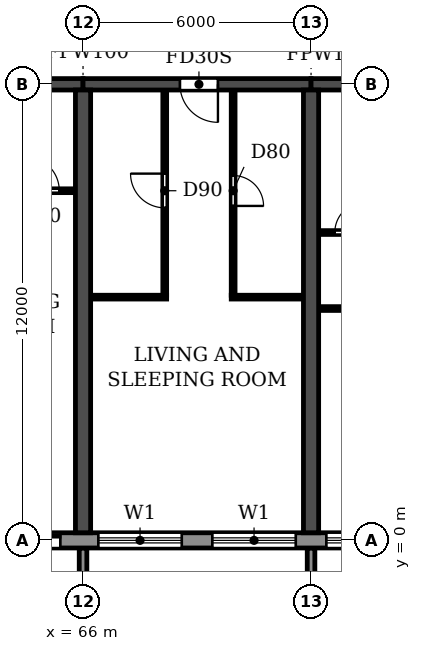
"""IFC4 building model, lengths in metres.
Left out: names, types, materials, properties, quantities, classifications, styles, units other than length and angle.
Written with IfcOpenShell. Run it as: python <this file> out.ifc"""

import sys

from ifc_helpers import new_model, si_unit, direction, frame, frame_2d, origin, place, context, subcontext, project, spatial, polyline, rectangle, outline, extrude, source, transform, mapped, element, fill, save


model = new_model("IFC4")
c1 = context("Model", 3, precision=1e-05, world=origin(), true_north=direction((0.0, 1.0)))
c2 = subcontext(c1, "Body", "Model", "MODEL_VIEW")
j1 = project(units=[si_unit("LENGTHUNIT", "METRE"), si_unit("PLANEANGLEUNIT", "RADIAN")], contexts=[c1])
p1 = place(None, origin())
s1 = spatial("IfcSite", under=j1, at=p1, CompositionType="ELEMENT")
p2 = place(p1, origin())
s2 = spatial("IfcBuilding", under=s1, at=p2, CompositionType="ELEMENT")
p3 = place(p2, frame((0.0, 0.0, 43.2)))
s3 = spatial("IfcBuildingStorey", under=s2, at=p3, CompositionType="ELEMENT", Elevation=43.2)
for number, where, z_axis, x_axis in (
    (1, (66.0, 0.2, 0.0), (0.0, 0.0, 1.0), (0.0, 1.0, 0.0)),
    (2, (72.0, 0.2, 0.0), (0.0, 0.0, 1.0), (0.0, 1.0, 0.0)),
):
    element("IfcWall", number, at=place(p3, frame(where, z_axis=z_axis, x_axis=x_axis)), inside=s3, PredefinedType="SHEAR", context=c2, shape_type="SweptSolid", body=[
        extrude(rectangle(XDim=11.65, YDim=0.4, at=frame_2d((5.825, 0.0))), origin(), (0.0, 0.0, 1.0), 3.05),
    ])
p4 = place(p3, frame((60.0, 12.0, 0.0), z_axis=(0.0, 0.0, 1.0), x_axis=(1.0, 0.0, 0.0)))
e3 = element("IfcWall", 3, at=p4, inside=s3, PredefinedType="SHEAR", context=c2, shape_type="SweptSolid", body=[
    extrude(rectangle(XDim=6.0, YDim=0.3, at=frame_2d((3.0, 0.0))), origin(), (0.0, 0.0, 1.0), 2.45),
])
p5 = place(p4, frame((2.45, 0.0, 0.0)))
e4 = element("IfcOpeningElement", 4, at=p5, cuts=e3, PredefinedType="OPENING", context=c2, shape_type="SweptSolid", body=[
    extrude(rectangle(XDim=1.0, YDim=2.1, at=frame_2d((0.5, 1.05))), frame((0.0, 0.16, 0.0), z_axis=(0.0, -1.0, 0.0), x_axis=(1.0, 0.0, 0.0)), (0.0, 0.0, 1.0), 0.32),
])
p6 = place(p3, frame((66.0, 12.0, 0.0), z_axis=(0.0, 0.0, 1.0), x_axis=(1.0, 0.0, 0.0)))
e5 = element("IfcWall", 5, at=p6, inside=s3, PredefinedType="SHEAR", context=c2, shape_type="SweptSolid", body=[
    extrude(rectangle(XDim=6.0, YDim=0.3, at=frame_2d((3.0, 0.0))), origin(), (0.0, 0.0, 1.0), 2.45),
])
p7 = place(p6, frame((2.55, 0.0, 0.0)))
e6 = element("IfcOpeningElement", 6, at=p7, cuts=e5, PredefinedType="OPENING", context=c2, shape_type="SweptSolid", body=[
    extrude(rectangle(XDim=1.0, YDim=2.1, at=frame_2d((0.5, 1.05))), frame((0.0, 0.16, 0.0), z_axis=(0.0, -1.0, 0.0), x_axis=(1.0, 0.0, 0.0)), (0.0, 0.0, 1.0), 0.32),
])
p8 = place(p3, frame((72.0, 12.0, 0.0), z_axis=(0.0, 0.0, 1.0), x_axis=(1.0, 0.0, 0.0)))
e7 = element("IfcWall", 7, at=p8, inside=s3, PredefinedType="SHEAR", context=c2, shape_type="SweptSolid", body=[
    extrude(rectangle(XDim=6.0, YDim=0.3, at=frame_2d((3.0, 0.0))), origin(), (0.0, 0.0, 1.0), 2.45),
])
p9 = place(p8, frame((2.45, 0.0, 0.0)))
e8 = element("IfcOpeningElement", 8, at=p9, cuts=e7, PredefinedType="OPENING", context=c2, shape_type="SweptSolid", body=[
    extrude(rectangle(XDim=1.0, YDim=2.1, at=frame_2d((0.5, 1.05))), frame((0.0, 0.16, 0.0), z_axis=(0.0, -1.0, 0.0), x_axis=(1.0, 0.0, 0.0)), (0.0, 0.0, 1.0), 0.32),
])
p10 = place(p3, frame((4.683, 0.0, 0.0), z_axis=(0.0, 0.0, 1.0), x_axis=(1.0, 0.0, 0.0)))
e9 = element("IfcWall", 9, at=p10, inside=s3, PredefinedType="STANDARD", context=c2, shape_type="SweptSolid", body=[
    extrude(rectangle(XDim=92.634, YDim=0.4, at=frame_2d((46.317, 0.0))), origin(), (0.0, 0.0, 1.0), 3.05),
])
p11 = place(p10, frame((1.717, 0.0, 0.9)))
e10 = element("IfcOpeningElement", 10, at=p11, cuts=e9, PredefinedType="OPENING", context=c2, shape_type="SweptSolid", body=[
    extrude(rectangle(XDim=2.2, YDim=1.5, at=frame_2d((1.1, 0.75))), frame((0.0, 0.21, 0.0), z_axis=(0.0, -1.0, 0.0), x_axis=(1.0, 0.0, 0.0)), (0.0, 0.0, 1.0), 0.42),
])
p12 = place(p10, frame((4.717, 0.0, 0.9)))
e11 = element("IfcOpeningElement", 11, at=p12, cuts=e9, PredefinedType="OPENING", context=c2, shape_type="SweptSolid", body=[
    extrude(rectangle(XDim=2.2, YDim=1.5, at=frame_2d((1.1, 0.75))), frame((0.0, 0.21, 0.0), z_axis=(0.0, -1.0, 0.0), x_axis=(1.0, 0.0, 0.0)), (0.0, 0.0, 1.0), 0.42),
])
p13 = place(p10, frame((7.717, 0.0, 0.9)))
e12 = element("IfcOpeningElement", 12, at=p13, cuts=e9, PredefinedType="OPENING", context=c2, shape_type="SweptSolid", body=[
    extrude(rectangle(XDim=2.2, YDim=1.5, at=frame_2d((1.1, 0.75))), frame((0.0, 0.21, 0.0), z_axis=(0.0, -1.0, 0.0), x_axis=(1.0, 0.0, 0.0)), (0.0, 0.0, 1.0), 0.42),
])
p14 = place(p10, frame((10.917, 0.0, 0.0)))
e13 = element("IfcOpeningElement", 13, at=p14, cuts=e9, PredefinedType="OPENING", context=c2, shape_type="SweptSolid", body=[
    extrude(rectangle(XDim=1.8, YDim=2.4, at=frame_2d((0.9, 1.2))), frame((0.0, 0.21, 0.0), z_axis=(0.0, -1.0, 0.0), x_axis=(1.0, 0.0, 0.0)), (0.0, 0.0, 1.0), 0.42),
])
p15 = place(p10, frame((13.717, 0.0, 0.9)))
e14 = element("IfcOpeningElement", 14, at=p15, cuts=e9, PredefinedType="OPENING", context=c2, shape_type="SweptSolid", body=[
    extrude(rectangle(XDim=2.2, YDim=1.5, at=frame_2d((1.1, 0.75))), frame((0.0, 0.21, 0.0), z_axis=(0.0, -1.0, 0.0), x_axis=(1.0, 0.0, 0.0)), (0.0, 0.0, 1.0), 0.42),
])
p16 = place(p10, frame((16.717, 0.0, 0.9)))
e15 = element("IfcOpeningElement", 15, at=p16, cuts=e9, PredefinedType="OPENING", context=c2, shape_type="SweptSolid", body=[
    extrude(rectangle(XDim=2.2, YDim=1.5, at=frame_2d((1.1, 0.75))), frame((0.0, 0.21, 0.0), z_axis=(0.0, -1.0, 0.0), x_axis=(1.0, 0.0, 0.0)), (0.0, 0.0, 1.0), 0.42),
])
p17 = place(p10, frame((19.917, 0.0, 0.0)))
e16 = element("IfcOpeningElement", 16, at=p17, cuts=e9, PredefinedType="OPENING", context=c2, shape_type="SweptSolid", body=[
    extrude(rectangle(XDim=1.8, YDim=2.4, at=frame_2d((0.9, 1.2))), frame((0.0, 0.21, 0.0), z_axis=(0.0, -1.0, 0.0), x_axis=(1.0, 0.0, 0.0)), (0.0, 0.0, 1.0), 0.42),
])
p18 = place(p10, frame((22.717, 0.0, 0.9)))
e17 = element("IfcOpeningElement", 17, at=p18, cuts=e9, PredefinedType="OPENING", context=c2, shape_type="SweptSolid", body=[
    extrude(rectangle(XDim=2.2, YDim=1.5, at=frame_2d((1.1, 0.75))), frame((0.0, 0.21, 0.0), z_axis=(0.0, -1.0, 0.0), x_axis=(1.0, 0.0, 0.0)), (0.0, 0.0, 1.0), 0.42),
])
p19 = place(p10, frame((25.717, 0.0, 0.9)))
e18 = element("IfcOpeningElement", 18, at=p19, cuts=e9, PredefinedType="OPENING", context=c2, shape_type="SweptSolid", body=[
    extrude(rectangle(XDim=2.2, YDim=1.5, at=frame_2d((1.1, 0.75))), frame((0.0, 0.21, 0.0), z_axis=(0.0, -1.0, 0.0), x_axis=(1.0, 0.0, 0.0)), (0.0, 0.0, 1.0), 0.42),
])
p20 = place(p10, frame((28.717, 0.0, 0.9)))
e19 = element("IfcOpeningElement", 19, at=p20, cuts=e9, PredefinedType="OPENING", context=c2, shape_type="SweptSolid", body=[
    extrude(rectangle(XDim=2.2, YDim=1.5, at=frame_2d((1.1, 0.75))), frame((0.0, 0.21, 0.0), z_axis=(0.0, -1.0, 0.0), x_axis=(1.0, 0.0, 0.0)), (0.0, 0.0, 1.0), 0.42),
])
p21 = place(p10, frame((31.717, 0.0, 0.9)))
e20 = element("IfcOpeningElement", 20, at=p21, cuts=e9, PredefinedType="OPENING", context=c2, shape_type="SweptSolid", body=[
    extrude(rectangle(XDim=2.2, YDim=1.5, at=frame_2d((1.1, 0.75))), frame((0.0, 0.21, 0.0), z_axis=(0.0, -1.0, 0.0), x_axis=(1.0, 0.0, 0.0)), (0.0, 0.0, 1.0), 0.42),
])
p22 = place(p10, frame((34.917, 0.0, 0.0)))
e21 = element("IfcOpeningElement", 21, at=p22, cuts=e9, PredefinedType="OPENING", context=c2, shape_type="SweptSolid", body=[
    extrude(rectangle(XDim=1.8, YDim=2.4, at=frame_2d((0.9, 1.2))), frame((0.0, 0.21, 0.0), z_axis=(0.0, -1.0, 0.0), x_axis=(1.0, 0.0, 0.0)), (0.0, 0.0, 1.0), 0.42),
])
p23 = place(p10, frame((37.717, 0.0, 0.9)))
e22 = element("IfcOpeningElement", 22, at=p23, cuts=e9, PredefinedType="OPENING", context=c2, shape_type="SweptSolid", body=[
    extrude(rectangle(XDim=2.2, YDim=1.5, at=frame_2d((1.1, 0.75))), frame((0.0, 0.21, 0.0), z_axis=(0.0, -1.0, 0.0), x_axis=(1.0, 0.0, 0.0)), (0.0, 0.0, 1.0), 0.42),
])
p24 = place(p10, frame((40.717, 0.0, 0.9)))
e23 = element("IfcOpeningElement", 23, at=p24, cuts=e9, PredefinedType="OPENING", context=c2, shape_type="SweptSolid", body=[
    extrude(rectangle(XDim=2.2, YDim=1.5, at=frame_2d((1.1, 0.75))), frame((0.0, 0.21, 0.0), z_axis=(0.0, -1.0, 0.0), x_axis=(1.0, 0.0, 0.0)), (0.0, 0.0, 1.0), 0.42),
])
p25 = place(p10, frame((43.717, 0.0, 0.9)))
e24 = element("IfcOpeningElement", 24, at=p25, cuts=e9, PredefinedType="OPENING", context=c2, shape_type="SweptSolid", body=[
    extrude(rectangle(XDim=2.2, YDim=1.5, at=frame_2d((1.1, 0.75))), frame((0.0, 0.21, 0.0), z_axis=(0.0, -1.0, 0.0), x_axis=(1.0, 0.0, 0.0)), (0.0, 0.0, 1.0), 0.42),
])
p26 = place(p10, frame((46.917, 0.0, 0.0)))
e25 = element("IfcOpeningElement", 25, at=p26, cuts=e9, PredefinedType="OPENING", context=c2, shape_type="SweptSolid", body=[
    extrude(rectangle(XDim=1.8, YDim=2.4, at=frame_2d((0.9, 1.2))), frame((0.0, 0.21, 0.0), z_axis=(0.0, -1.0, 0.0), x_axis=(1.0, 0.0, 0.0)), (0.0, 0.0, 1.0), 0.42),
])
p27 = place(p10, frame((49.717, 0.0, 0.9)))
e26 = element("IfcOpeningElement", 26, at=p27, cuts=e9, PredefinedType="OPENING", context=c2, shape_type="SweptSolid", body=[
    extrude(rectangle(XDim=2.2, YDim=1.5, at=frame_2d((1.1, 0.75))), frame((0.0, 0.21, 0.0), z_axis=(0.0, -1.0, 0.0), x_axis=(1.0, 0.0, 0.0)), (0.0, 0.0, 1.0), 0.42),
])
p28 = place(p10, frame((52.717, 0.0, 0.9)))
e27 = element("IfcOpeningElement", 27, at=p28, cuts=e9, PredefinedType="OPENING", context=c2, shape_type="SweptSolid", body=[
    extrude(rectangle(XDim=2.2, YDim=1.5, at=frame_2d((1.1, 0.75))), frame((0.0, 0.21, 0.0), z_axis=(0.0, -1.0, 0.0), x_axis=(1.0, 0.0, 0.0)), (0.0, 0.0, 1.0), 0.42),
])
p29 = place(p10, frame((55.717, 0.0, 0.9)))
e28 = element("IfcOpeningElement", 28, at=p29, cuts=e9, PredefinedType="OPENING", context=c2, shape_type="SweptSolid", body=[
    extrude(rectangle(XDim=2.2, YDim=1.5, at=frame_2d((1.1, 0.75))), frame((0.0, 0.21, 0.0), z_axis=(0.0, -1.0, 0.0), x_axis=(1.0, 0.0, 0.0)), (0.0, 0.0, 1.0), 0.42),
])
p30 = place(p10, frame((58.917, 0.0, 0.0)))
e29 = element("IfcOpeningElement", 29, at=p30, cuts=e9, PredefinedType="OPENING", context=c2, shape_type="SweptSolid", body=[
    extrude(rectangle(XDim=1.8, YDim=2.4, at=frame_2d((0.9, 1.2))), frame((0.0, 0.21, 0.0), z_axis=(0.0, -1.0, 0.0), x_axis=(1.0, 0.0, 0.0)), (0.0, 0.0, 1.0), 0.42),
])
p31 = place(p10, frame((61.717, 0.0, 0.9)))
e30 = element("IfcOpeningElement", 30, at=p31, cuts=e9, PredefinedType="OPENING", context=c2, shape_type="SweptSolid", body=[
    extrude(rectangle(XDim=2.2, YDim=1.5, at=frame_2d((1.1, 0.75))), frame((0.0, 0.21, 0.0), z_axis=(0.0, -1.0, 0.0), x_axis=(1.0, 0.0, 0.0)), (0.0, 0.0, 1.0), 0.42),
])
p32 = place(p10, frame((64.717, 0.0, 0.9)))
e31 = element("IfcOpeningElement", 31, at=p32, cuts=e9, PredefinedType="OPENING", context=c2, shape_type="SweptSolid", body=[
    extrude(rectangle(XDim=2.2, YDim=1.5, at=frame_2d((1.1, 0.75))), frame((0.0, 0.21, 0.0), z_axis=(0.0, -1.0, 0.0), x_axis=(1.0, 0.0, 0.0)), (0.0, 0.0, 1.0), 0.42),
])
p33 = place(p10, frame((67.717, 0.0, 0.9)))
e32 = element("IfcOpeningElement", 32, at=p33, cuts=e9, PredefinedType="OPENING", context=c2, shape_type="SweptSolid", body=[
    extrude(rectangle(XDim=2.2, YDim=1.5, at=frame_2d((1.1, 0.75))), frame((0.0, 0.21, 0.0), z_axis=(0.0, -1.0, 0.0), x_axis=(1.0, 0.0, 0.0)), (0.0, 0.0, 1.0), 0.42),
])
p34 = place(p10, frame((70.917, 0.0, 0.0)))
e33 = element("IfcOpeningElement", 33, at=p34, cuts=e9, PredefinedType="OPENING", context=c2, shape_type="SweptSolid", body=[
    extrude(rectangle(XDim=1.8, YDim=2.4, at=frame_2d((0.9, 1.2))), frame((0.0, 0.21, 0.0), z_axis=(0.0, -1.0, 0.0), x_axis=(1.0, 0.0, 0.0)), (0.0, 0.0, 1.0), 0.42),
])
p35 = place(p10, frame((73.717, 0.0, 0.9)))
e34 = element("IfcOpeningElement", 34, at=p35, cuts=e9, PredefinedType="OPENING", context=c2, shape_type="SweptSolid", body=[
    extrude(rectangle(XDim=2.2, YDim=1.5, at=frame_2d((1.1, 0.75))), frame((0.0, 0.21, 0.0), z_axis=(0.0, -1.0, 0.0), x_axis=(1.0, 0.0, 0.0)), (0.0, 0.0, 1.0), 0.42),
])
p36 = place(p10, frame((76.717, 0.0, 0.9)))
e35 = element("IfcOpeningElement", 35, at=p36, cuts=e9, PredefinedType="OPENING", context=c2, shape_type="SweptSolid", body=[
    extrude(rectangle(XDim=2.2, YDim=1.5, at=frame_2d((1.1, 0.75))), frame((0.0, 0.21, 0.0), z_axis=(0.0, -1.0, 0.0), x_axis=(1.0, 0.0, 0.0)), (0.0, 0.0, 1.0), 0.42),
])
p37 = place(p10, frame((79.717, 0.0, 0.9)))
e36 = element("IfcOpeningElement", 36, at=p37, cuts=e9, PredefinedType="OPENING", context=c2, shape_type="SweptSolid", body=[
    extrude(rectangle(XDim=2.2, YDim=1.5, at=frame_2d((1.1, 0.75))), frame((0.0, 0.21, 0.0), z_axis=(0.0, -1.0, 0.0), x_axis=(1.0, 0.0, 0.0)), (0.0, 0.0, 1.0), 0.42),
])
p38 = place(p10, frame((82.917, 0.0, 0.0)))
e37 = element("IfcOpeningElement", 37, at=p38, cuts=e9, PredefinedType="OPENING", context=c2, shape_type="SweptSolid", body=[
    extrude(rectangle(XDim=1.8, YDim=2.4, at=frame_2d((0.9, 1.2))), frame((0.0, 0.21, 0.0), z_axis=(0.0, -1.0, 0.0), x_axis=(1.0, 0.0, 0.0)), (0.0, 0.0, 1.0), 0.42),
])
p39 = place(p10, frame((85.717, 0.0, 0.9)))
e38 = element("IfcOpeningElement", 38, at=p39, cuts=e9, PredefinedType="OPENING", context=c2, shape_type="SweptSolid", body=[
    extrude(rectangle(XDim=2.2, YDim=1.5, at=frame_2d((1.1, 0.75))), frame((0.0, 0.21, 0.0), z_axis=(0.0, -1.0, 0.0), x_axis=(1.0, 0.0, 0.0)), (0.0, 0.0, 1.0), 0.42),
])
p40 = place(p10, frame((88.717, 0.0, 0.9)))
e39 = element("IfcOpeningElement", 39, at=p40, cuts=e9, PredefinedType="OPENING", context=c2, shape_type="SweptSolid", body=[
    extrude(rectangle(XDim=2.2, YDim=1.5, at=frame_2d((1.1, 0.75))), frame((0.0, 0.21, 0.0), z_axis=(0.0, -1.0, 0.0), x_axis=(1.0, 0.0, 0.0)), (0.0, 0.0, 1.0), 0.42),
])
m1 = source(origin(), c2, "Body", "SweptSolid", [
    extrude(outline(polyline([(0.0, 0.0), (0.2, 0.0), (0.2, 1.65), (0.0, 1.65), (0.0, 0.0)])), origin(), (0.0, 0.0, 1.0), 3.1),
])
for number, where in (
    (40, (65.9, -1.85, 0.0)),
    (41, (71.9, -1.85, 0.0)),
):
    element("IfcWall", number, at=place(p3, frame(where)), inside=s3, PredefinedType="STANDARD", context=c2, shape_type="MappedRepresentation", body=[
        mapped(m1, transform((0.0, 0.0, 0.0))),
    ])
p41 = place(p3, frame((72.21, 6.1, 0.0), z_axis=(0.0, 0.0, 1.0), x_axis=(1.0, 0.0, 0.0)))
e42 = element("IfcWall", 42, at=p41, inside=s3, PredefinedType="PARTITIONING", context=c2, shape_type="SweptSolid", body=[
    extrude(rectangle(XDim=2.84, YDim=0.1, at=frame_2d((1.42, 0.0))), origin(), (0.0, 0.0, 1.0), 3.05),
])
p42 = place(p41, frame((1.39, 0.0, 0.0)))
e43 = element("IfcOpeningElement", 43, at=p42, cuts=e42, PredefinedType="OPENING", context=c2, shape_type="SweptSolid", body=[
    extrude(rectangle(XDim=0.9, YDim=2.1, at=frame_2d((0.45, 1.05))), frame((0.0, 0.06, 0.0), z_axis=(0.0, -1.0, 0.0), x_axis=(1.0, 0.0, 0.0)), (0.0, 0.0, 1.0), 0.12),
])
p43 = place(p3, frame((66.21, 6.4, 0.0), z_axis=(0.0, 0.0, 1.0), x_axis=(1.0, 0.0, 0.0)))
e44 = element("IfcWall", 44, at=p43, inside=s3, PredefinedType="PARTITIONING", context=c2, shape_type="SweptSolid", body=[
    extrude(rectangle(XDim=1.99, YDim=0.1, at=frame_2d((0.995, 0.0))), origin(), (0.0, 0.0, 1.0), 3.05),
])
p44 = place(p3, frame((69.9, 6.4, 0.0), z_axis=(0.0, 0.0, 1.0), x_axis=(1.0, 0.0, 0.0)))
e45 = element("IfcWall", 45, at=p44, inside=s3, PredefinedType="PARTITIONING", context=c2, shape_type="SweptSolid", body=[
    extrude(rectangle(XDim=1.89, YDim=0.1, at=frame_2d((0.945, 0.0))), origin(), (0.0, 0.0, 1.0), 3.05),
])
p45 = place(p3, frame((72.21, 8.1, 0.0), z_axis=(0.0, 0.0, 1.0), x_axis=(1.0, 0.0, 0.0)))
e46 = element("IfcWall", 46, at=p45, inside=s3, PredefinedType="PARTITIONING", context=c2, shape_type="SweptSolid", body=[
    extrude(rectangle(XDim=1.89, YDim=0.1, at=frame_2d((0.945, 0.0))), origin(), (0.0, 0.0, 1.0), 3.05),
])
p46 = place(p45, frame((0.415, 0.0, 0.0)))
e47 = element("IfcOpeningElement", 47, at=p46, cuts=e46, PredefinedType="OPENING", context=c2, shape_type="SweptSolid", body=[
    extrude(rectangle(XDim=0.8, YDim=2.1, at=frame_2d((0.4, 1.05))), frame((0.0, 0.06, 0.0), z_axis=(0.0, -1.0, 0.0), x_axis=(1.0, 0.0, 0.0)), (0.0, 0.0, 1.0), 0.12),
])
p47 = place(p3, frame((63.8, 9.2, 0.0), z_axis=(0.0, 0.0, 1.0), x_axis=(1.0, 0.0, 0.0)))
e48 = element("IfcWall", 48, at=p47, inside=s3, PredefinedType="PARTITIONING", context=c2, shape_type="SweptSolid", body=[
    extrude(rectangle(XDim=1.99, YDim=0.1, at=frame_2d((0.995, 0.0))), origin(), (0.0, 0.0, 1.0), 3.05),
])
p48 = place(p47, frame((0.675, 0.0, 0.0)))
e49 = element("IfcOpeningElement", 49, at=p48, cuts=e48, PredefinedType="OPENING", context=c2, shape_type="SweptSolid", body=[
    extrude(rectangle(XDim=0.9, YDim=2.1, at=frame_2d((0.45, 1.05))), frame((0.0, 0.06, 0.0), z_axis=(0.0, -1.0, 0.0), x_axis=(1.0, 0.0, 0.0)), (0.0, 0.0, 1.0), 0.12),
])
p49 = place(p3, frame((68.15, 6.45, 0.0), z_axis=(0.0, 0.0, 1.0), x_axis=(0.0, 1.0, 0.0)))
e50 = element("IfcWall", 50, at=p49, inside=s3, PredefinedType="PARTITIONING", context=c2, shape_type="SweptSolid", body=[
    extrude(rectangle(XDim=5.39, YDim=0.1, at=frame_2d((2.695, 0.0))), origin(), (0.0, 0.0, 1.0), 3.05),
])
p50 = place(p49, frame((2.3, 0.0, 0.0)))
e51 = element("IfcOpeningElement", 51, at=p50, cuts=e50, PredefinedType="OPENING", context=c2, shape_type="SweptSolid", body=[
    extrude(rectangle(XDim=0.9, YDim=2.1, at=frame_2d((0.45, 1.05))), frame((0.0, 0.06, 0.0), z_axis=(0.0, -1.0, 0.0), x_axis=(1.0, 0.0, 0.0)), (0.0, 0.0, 1.0), 0.12),
])
p51 = place(p3, frame((69.95, 6.45, 0.0), z_axis=(0.0, 0.0, 1.0), x_axis=(0.0, 1.0, 0.0)))
e52 = element("IfcWall", 52, at=p51, inside=s3, PredefinedType="PARTITIONING", context=c2, shape_type="SweptSolid", body=[
    extrude(rectangle(XDim=5.39, YDim=0.1, at=frame_2d((2.695, 0.0))), origin(), (0.0, 0.0, 1.0), 3.05),
])
p52 = place(p51, frame((2.35, 0.0, 0.0)))
e53 = element("IfcOpeningElement", 53, at=p52, cuts=e52, PredefinedType="OPENING", context=c2, shape_type="SweptSolid", body=[
    extrude(rectangle(XDim=0.8, YDim=2.1, at=frame_2d((0.4, 1.05))), frame((0.0, 0.06, 0.0), z_axis=(0.0, -1.0, 0.0), x_axis=(1.0, 0.0, 0.0)), (0.0, 0.0, 1.0), 0.12),
])
p53 = place(p30, origin())
e54 = element("IfcDoor", 54, at=p53, inside=s3, OperationType="DOUBLE_DOOR_SLIDING", PredefinedType="DOOR", context=c2, shape_type="SweptSolid", body=[
    extrude(rectangle(XDim=1.8, YDim=2.4, at=frame_2d((0.9, 1.2))), frame((0.0, 0.025, 0.0), z_axis=(0.0, -1.0, 0.0), x_axis=(1.0, 0.0, 0.0)), (0.0, 0.0, 1.0), 0.05),
])
fill(e29, e54)
p54 = place(p31, origin())
e55 = element("IfcWindow", 55, at=p54, inside=s3, PartitioningType="DOUBLE_PANEL_HORIZONTAL", PredefinedType="WINDOW", context=c2, shape_type="SweptSolid", body=[
    extrude(rectangle(XDim=2.2, YDim=1.5, at=frame_2d((1.1, 0.75))), frame((0.0, 0.03, 0.0), z_axis=(0.0, -1.0, 0.0), x_axis=(1.0, 0.0, 0.0)), (0.0, 0.0, 1.0), 0.06),
])
fill(e30, e55)
p55 = place(p32, origin())
e56 = element("IfcWindow", 56, at=p55, inside=s3, PartitioningType="DOUBLE_PANEL_HORIZONTAL", PredefinedType="WINDOW", context=c2, shape_type="SweptSolid", body=[
    extrude(rectangle(XDim=2.2, YDim=1.5, at=frame_2d((1.1, 0.75))), frame((0.0, 0.03, 0.0), z_axis=(0.0, -1.0, 0.0), x_axis=(1.0, 0.0, 0.0)), (0.0, 0.0, 1.0), 0.06),
])
fill(e31, e56)
p56 = place(p33, origin())
e57 = element("IfcWindow", 57, at=p56, inside=s3, PartitioningType="DOUBLE_PANEL_HORIZONTAL", PredefinedType="WINDOW", context=c2, shape_type="SweptSolid", body=[
    extrude(rectangle(XDim=2.2, YDim=1.5, at=frame_2d((1.1, 0.75))), frame((0.0, 0.03, 0.0), z_axis=(0.0, -1.0, 0.0), x_axis=(1.0, 0.0, 0.0)), (0.0, 0.0, 1.0), 0.06),
])
fill(e32, e57)
p57 = place(p48, origin())
e58 = element("IfcDoor", 58, at=p57, inside=s3, OperationType="SINGLE_SWING_LEFT", PredefinedType="DOOR", context=c2, shape_type="SweptSolid", body=[
    extrude(rectangle(XDim=0.9, YDim=2.1, at=frame_2d((0.45, 1.05))), frame((0.0, 0.025, 0.0), z_axis=(0.0, -1.0, 0.0), x_axis=(1.0, 0.0, 0.0)), (0.0, 0.0, 1.0), 0.05),
])
fill(e49, e58)
p58 = place(p50, origin())
e59 = element("IfcDoor", 59, at=p58, inside=s3, OperationType="SINGLE_SWING_RIGHT", PredefinedType="DOOR", context=c2, shape_type="SweptSolid", body=[
    extrude(rectangle(XDim=0.9, YDim=2.1, at=frame_2d((0.45, 1.05))), frame((0.0, 0.025, 0.0), z_axis=(0.0, -1.0, 0.0), x_axis=(1.0, 0.0, 0.0)), (0.0, 0.0, 1.0), 0.05),
])
fill(e51, e59)
p59 = place(p7, frame((1.0, 0.0, 0.0), z_axis=(0.0, 0.0, 1.0), x_axis=(-1.0, 0.0, 0.0)))
e60 = element("IfcDoor", 60, at=p59, inside=s3, OperationType="SINGLE_SWING_LEFT", PredefinedType="DOOR", context=c2, shape_type="SweptSolid", body=[
    extrude(rectangle(XDim=1.0, YDim=2.1, at=frame_2d((0.5, 1.05))), frame((0.0, 0.025, 0.0), z_axis=(0.0, -1.0, 0.0), x_axis=(1.0, 0.0, 0.0)), (0.0, 0.0, 1.0), 0.05),
])
fill(e6, e60)
p60 = place(p52, frame((0.8, 0.0, 0.0), z_axis=(0.0, 0.0, 1.0), x_axis=(-1.0, 0.0, 0.0)))
e61 = element("IfcDoor", 61, at=p60, inside=s3, OperationType="SINGLE_SWING_RIGHT", PredefinedType="DOOR", context=c2, shape_type="SweptSolid", body=[
    extrude(rectangle(XDim=0.8, YDim=2.1, at=frame_2d((0.4, 1.05))), frame((0.0, 0.025, 0.0), z_axis=(0.0, -1.0, 0.0), x_axis=(1.0, 0.0, 0.0)), (0.0, 0.0, 1.0), 0.05),
])
fill(e53, e61)
p61 = place(p46, origin())
e62 = element("IfcDoor", 62, at=p61, inside=s3, OperationType="SINGLE_SWING_RIGHT", PredefinedType="DOOR", context=c2, shape_type="SweptSolid", body=[
    extrude(rectangle(XDim=0.8, YDim=2.1, at=frame_2d((0.4, 1.05))), frame((0.0, 0.025, 0.0), z_axis=(0.0, -1.0, 0.0), x_axis=(1.0, 0.0, 0.0)), (0.0, 0.0, 1.0), 0.05),
])
fill(e47, e62)
save(model, sys.argv[1])
